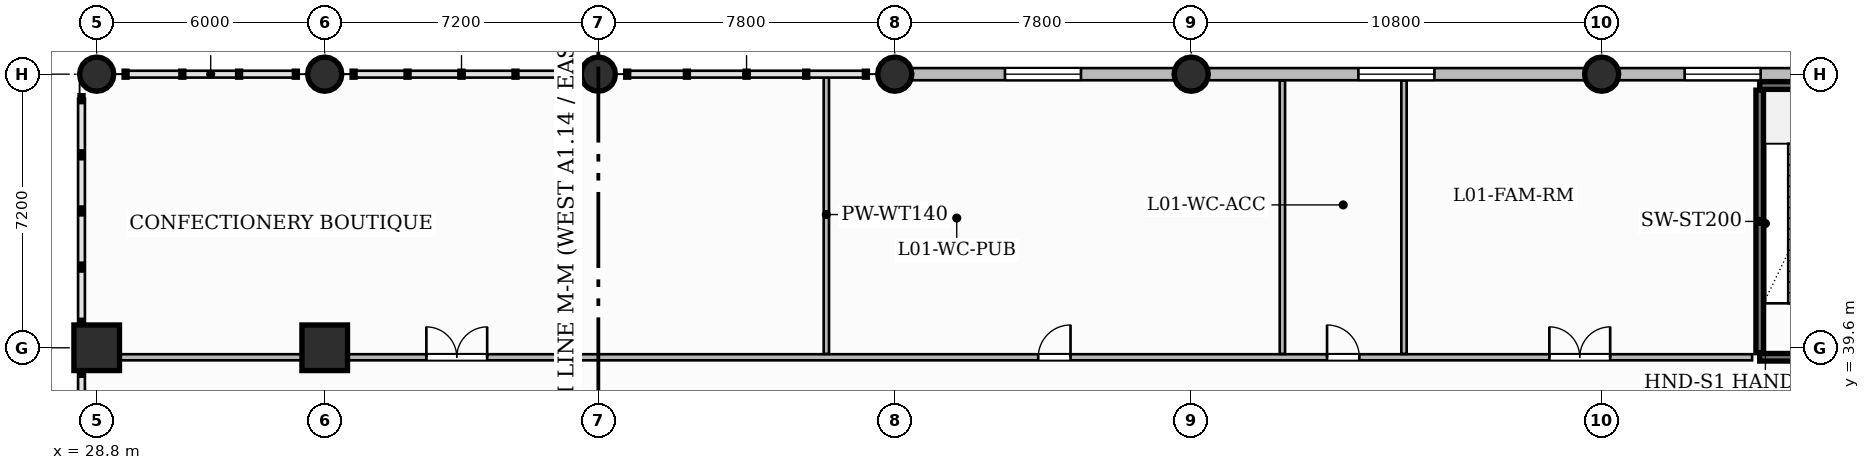
"""IFC4 building model, lengths in metres.
Left out: names, types, materials, properties, quantities, classifications, styles, units other than length and angle.
Written with IfcOpenShell. Run it as: python <this file> out.ifc"""

import sys

from ifc_helpers import new_model, si_unit, direction, frame, frame_2d, origin, origin_2d, place, context, subcontext, project, spatial, rectangle, circle, extrude, source, transform, mapped, element, fill, save


model = new_model("IFC4")
c1 = context("Model", 3, precision=1e-05, world=origin(), true_north=direction((0.0, 1.0)))
c2 = subcontext(c1, "Body", "Model", "MODEL_VIEW")
j1 = project(units=[si_unit("LENGTHUNIT", "METRE"), si_unit("PLANEANGLEUNIT", "RADIAN")], contexts=[c1])
p1 = place(None, origin())
s1 = spatial("IfcSite", under=j1, at=p1, CompositionType="ELEMENT")
p2 = place(p1, origin())
s2 = spatial("IfcBuilding", under=s1, at=p2, CompositionType="ELEMENT")
p3 = place(p2, frame((0.0, 0.0, 5.4)))
s3 = spatial("IfcBuildingStorey", under=s2, at=p3, CompositionType="ELEMENT", Elevation=5.4)
m1 = source(origin(), c2, "Body", "SweptSolid", [
    extrude(rectangle(XDim=1.2, YDim=1.2, at=origin_2d()), origin(), (0.0, 0.0, 1.0), 5.4),
])
p4 = place(p3, frame((28.8, 39.6, 0.0), z_axis=(0.0, 0.0, 1.0), x_axis=(1.0, 0.0, 0.0)))
e1 = element("IfcColumn", 1, at=p4, inside=s3, PredefinedType="COLUMN", context=c2, shape_type="MappedRepresentation", body=[
    mapped(m1, transform((0.0, 0.0, 0.0), scale=1.0)),
])
m2 = source(origin(), c2, "Body", "SweptSolid", [
    extrude(circle(Radius=0.45, at=origin_2d()), origin(), (0.0, 0.0, 1.0), 5.4),
])
p5 = place(p3, frame((28.8, 46.8, 0.0), z_axis=(0.0, 0.0, 1.0), x_axis=(1.0, 0.0, 0.0)))
e2 = element("IfcColumn", 2, at=p5, inside=s3, PredefinedType="COLUMN", context=c2, shape_type="MappedRepresentation", body=[
    mapped(m2, transform((0.0, 0.0, 0.0), scale=1.0)),
])
p6 = place(p3, frame((34.8, 39.6, 0.0), z_axis=(0.0, 0.0, 1.0), x_axis=(1.0, 0.0, 0.0)))
e3 = element("IfcColumn", 3, at=p6, inside=s3, PredefinedType="COLUMN", context=c2, shape_type="MappedRepresentation", body=[
    mapped(m1, transform((0.0, 0.0, 0.0), scale=1.0)),
])
for number, where, z_axis, x_axis in (
    (4, (34.8, 46.8, 0.0), (0.0, 0.0, 1.0), (1.0, 0.0, 0.0)),
    (5, (42.0, 46.8, 0.0), (0.0, 0.0, 1.0), (1.0, 0.0, 0.0)),
    (6, (49.8, 46.8, 0.0), (0.0, 0.0, 1.0), (1.0, 0.0, 0.0)),
    (7, (57.6, 46.8, 0.0), (0.0, 0.0, 1.0), (1.0, 0.0, 0.0)),
    (8, (68.4, 46.8, 0.0), (0.0, 0.0, 1.0), (1.0, 0.0, 0.0)),
):
    element("IfcColumn", number, at=place(p3, frame(where, z_axis=z_axis, x_axis=x_axis)), inside=s3, PredefinedType="COLUMN", context=c2, shape_type="MappedRepresentation", body=[
        mapped(m2, transform((0.0, 0.0, 0.0), scale=1.0)),
    ])
p7 = place(p3, frame((72.56, 39.47, 0.0), z_axis=(0.0, 0.0, 1.0), x_axis=(0.0, 1.0, 0.0)))
e9 = element("IfcWall", 9, at=p7, inside=s3, PredefinedType="SHEAR", context=c2, shape_type="SweptSolid", body=[
    extrude(rectangle(XDim=6.91, YDim=0.2, at=frame_2d((3.455, 0.0))), origin(), (0.0, 0.0, 1.0), 5.4),
])
p8 = place(p3, frame((72.56, 46.5, 0.0), z_axis=(0.0, 0.0, 1.0), x_axis=(1.0, 0.0, 0.0)))
e10 = element("IfcWall", 10, at=p8, inside=s3, PredefinedType="SHEAR", context=c2, shape_type="SweptSolid", body=[
    extrude(rectangle(XDim=2.94, YDim=0.2, at=frame_2d((1.47, 0.0))), origin(), (0.0, 0.0, 1.0), 5.4),
])
p9 = place(p3, frame((72.56, 39.35, 0.0), z_axis=(0.0, 0.0, 1.0), x_axis=(1.0, 0.0, 0.0)))
e11 = element("IfcWall", 11, at=p9, inside=s3, PredefinedType="SHEAR", context=c2, shape_type="SweptSolid", body=[
    extrude(rectangle(XDim=2.94, YDim=0.2, at=frame_2d((1.47, 0.0))), origin(), (0.0, 0.0, 1.0), 5.4),
])
p10 = place(p9, frame((0.985, 0.0, 0.0)))
e12 = element("IfcOpeningElement", 12, at=p10, cuts=e11, PredefinedType="OPENING", context=c2, shape_type="SweptSolid", body=[
    extrude(rectangle(XDim=1.05, YDim=2.2, at=frame_2d((0.525, 1.1))), frame((0.0, 0.11, 0.0), z_axis=(0.0, -1.0, 0.0), x_axis=(1.0, 0.0, 0.0)), (0.0, 0.0, 1.0), 0.22),
])
p11 = place(p3, frame((28.64, 39.35, 0.0), z_axis=(0.0, 0.0, 1.0), x_axis=(1.0, 0.0, 0.0)))
e13 = element("IfcWall", 13, at=p11, inside=s3, PredefinedType="PARTITIONING", context=c2, shape_type="SweptSolid", body=[
    extrude(rectangle(XDim=43.72, YDim=0.16, at=frame_2d((21.86, 0.0))), origin(), (0.0, 0.0, 1.0), 4.185),
])
p12 = place(p11, frame((8.835, 0.0, 0.0)))
e14 = element("IfcOpeningElement", 14, at=p12, cuts=e13, PredefinedType="OPENING", context=c2, shape_type="SweptSolid", body=[
    extrude(rectangle(XDim=1.6, YDim=2.4, at=frame_2d((0.8, 1.2))), frame((0.0, 0.09, 0.0), z_axis=(0.0, -1.0, 0.0), x_axis=(1.0, 0.0, 0.0)), (0.0, 0.0, 1.0), 0.18),
])
p13 = place(p11, frame((24.935, 0.0, 0.0)))
e15 = element("IfcOpeningElement", 15, at=p13, cuts=e13, PredefinedType="OPENING", context=c2, shape_type="SweptSolid", body=[
    extrude(rectangle(XDim=0.85, YDim=2.1, at=frame_2d((0.425, 1.05))), frame((0.0, 0.09, 0.0), z_axis=(0.0, -1.0, 0.0), x_axis=(1.0, 0.0, 0.0)), (0.0, 0.0, 1.0), 0.18),
])
p14 = place(p11, frame((32.535, 0.0, 0.0)))
e16 = element("IfcOpeningElement", 16, at=p14, cuts=e13, PredefinedType="OPENING", context=c2, shape_type="SweptSolid", body=[
    extrude(rectangle(XDim=0.85, YDim=2.1, at=frame_2d((0.425, 1.05))), frame((0.0, 0.09, 0.0), z_axis=(0.0, -1.0, 0.0), x_axis=(1.0, 0.0, 0.0)), (0.0, 0.0, 1.0), 0.18),
])
p15 = place(p11, frame((38.385, 0.0, 0.0)))
e17 = element("IfcOpeningElement", 17, at=p15, cuts=e13, PredefinedType="OPENING", context=c2, shape_type="SweptSolid", body=[
    extrude(rectangle(XDim=1.6, YDim=2.4, at=frame_2d((0.8, 1.2))), frame((0.0, 0.09, 0.0), z_axis=(0.0, -1.0, 0.0), x_axis=(1.0, 0.0, 0.0)), (0.0, 0.0, 1.0), 0.18),
])
p16 = place(p3, frame((48.0, 39.44, 0.0), z_axis=(0.0, 0.0, 1.0), x_axis=(0.0, 1.0, 0.0)))
e18 = element("IfcWall", 18, at=p16, inside=s3, PredefinedType="PARTITIONING", context=c2, shape_type="SweptSolid", body=[
    extrude(rectangle(XDim=7.332, YDim=0.14, at=frame_2d((3.666, 0.0))), origin(), (0.0, 0.0, 1.0), 5.1),
])
for number, where, z_axis, x_axis in (
    (19, (60.0, 39.44, 0.0), (0.0, 0.0, 1.0), (0.0, 1.0, 0.0)),
    (20, (63.2, 39.44, 0.0), (0.0, 0.0, 1.0), (0.0, 1.0, 0.0)),
):
    element("IfcWall", number, at=place(p3, frame(where, z_axis=z_axis, x_axis=x_axis)), inside=s3, PredefinedType="PARTITIONING", context=c2, shape_type="SweptSolid", body=[
        extrude(rectangle(XDim=7.192, YDim=0.14, at=frame_2d((3.596, 0.0))), origin(), (0.0, 0.0, 1.0), 5.1),
    ])
p17 = place(p3, frame((49.8, 46.8, 0.0), z_axis=(0.0, 0.0, 1.0), x_axis=(1.0, 0.0, 0.0)))
e21 = element("IfcWall", 21, at=p17, inside=s3, PredefinedType="SOLIDWALL", context=c2, shape_type="SweptSolid", body=[
    extrude(rectangle(XDim=30.6, YDim=0.32, at=frame_2d((15.3, 0.0))), origin(), (0.0, 0.0, 1.0), 4.185),
])
p18 = place(p17, frame((2.9, 0.0, 0.75)))
e22 = element("IfcOpeningElement", 22, at=p18, cuts=e21, PredefinedType="OPENING", context=c2, shape_type="SweptSolid", body=[
    extrude(rectangle(XDim=2.0, YDim=2.6, at=frame_2d((1.0, 1.3))), frame((0.0, 0.17, 0.0), z_axis=(0.0, -1.0, 0.0), x_axis=(1.0, 0.0, 0.0)), (0.0, 0.0, 1.0), 0.34),
])
p19 = place(p17, frame((12.2, 0.0, 0.75)))
e23 = element("IfcOpeningElement", 23, at=p19, cuts=e21, PredefinedType="OPENING", context=c2, shape_type="SweptSolid", body=[
    extrude(rectangle(XDim=2.0, YDim=2.6, at=frame_2d((1.0, 1.3))), frame((0.0, 0.17, 0.0), z_axis=(0.0, -1.0, 0.0), x_axis=(1.0, 0.0, 0.0)), (0.0, 0.0, 1.0), 0.34),
])
p20 = place(p17, frame((20.785, 0.0, 0.75)))
e24 = element("IfcOpeningElement", 24, at=p20, cuts=e21, PredefinedType="OPENING", context=c2, shape_type="SweptSolid", body=[
    extrude(rectangle(XDim=2.0, YDim=2.6, at=frame_2d((1.0, 1.3))), frame((0.0, 0.17, 0.0), z_axis=(0.0, -1.0, 0.0), x_axis=(1.0, 0.0, 0.0)), (0.0, 0.0, 1.0), 0.34),
])
p21 = place(p17, frame((25.445, 0.0, 0.75)))
e25 = element("IfcOpeningElement", 25, at=p21, cuts=e21, PredefinedType="OPENING", context=c2, shape_type="SweptSolid", body=[
    extrude(rectangle(XDim=2.0, YDim=2.6, at=frame_2d((1.0, 1.3))), frame((0.0, 0.17, 0.0), z_axis=(0.0, -1.0, 0.0), x_axis=(1.0, 0.0, 0.0)), (0.0, 0.0, 1.0), 0.34),
])
m3 = source(origin(), c2, "Body", "SweptSolid", [
    extrude(rectangle(XDim=1.6, YDim=2.4, at=frame_2d((0.8, 1.2))), frame((0.0, 0.025, 0.0), z_axis=(0.0, -1.0, 0.0), x_axis=(1.0, 0.0, 0.0)), (0.0, 0.0, 1.0), 0.05),
])
p22 = place(p12, origin())
e26 = element("IfcDoor", 26, at=p22, inside=s3, OperationType="DOUBLE_DOOR_SINGLE_SWING", PredefinedType="DOOR", context=c2, shape_type="MappedRepresentation", body=[
    mapped(m3, transform((0.0, 0.0, 0.0), scale=1.0)),
])
fill(e14, e26)
m4 = source(origin(), c2, "Body", "SweptSolid", [
    extrude(rectangle(XDim=0.85, YDim=2.1, at=frame_2d((0.425, 1.05))), frame((0.0, 0.025, 0.0), z_axis=(0.0, -1.0, 0.0), x_axis=(1.0, 0.0, 0.0)), (0.0, 0.0, 1.0), 0.05),
])
p23 = place(p13, origin())
e27 = element("IfcDoor", 27, at=p23, inside=s3, OperationType="SINGLE_SWING_RIGHT", PredefinedType="DOOR", context=c2, shape_type="MappedRepresentation", body=[
    mapped(m4, transform((0.0, 0.0, 0.0), scale=1.0)),
])
fill(e15, e27)
p24 = place(p14, origin())
e28 = element("IfcDoor", 28, at=p24, inside=s3, OperationType="SINGLE_SWING_LEFT", PredefinedType="DOOR", context=c2, shape_type="MappedRepresentation", body=[
    mapped(m4, transform((0.0, 0.0, 0.0), scale=1.0)),
])
fill(e16, e28)
p25 = place(p15, origin())
e29 = element("IfcDoor", 29, at=p25, inside=s3, OperationType="DOUBLE_DOOR_SINGLE_SWING", PredefinedType="DOOR", context=c2, shape_type="MappedRepresentation", body=[
    mapped(m3, transform((0.0, 0.0, 0.0), scale=1.0)),
])
fill(e17, e29)
m5 = source(origin(), c2, "Body", "SweptSolid", [
    extrude(rectangle(XDim=2.0, YDim=2.6, at=frame_2d((1.0, 1.3))), frame((0.0, 0.03, 0.0), z_axis=(0.0, -1.0, 0.0), x_axis=(1.0, 0.0, 0.0)), (0.0, 0.0, 1.0), 0.06),
])
p26 = place(p18, origin())
e30 = element("IfcWindow", 30, at=p26, inside=s3, PartitioningType="DOUBLE_PANEL_VERTICAL", PredefinedType="WINDOW", context=c2, shape_type="MappedRepresentation", body=[
    mapped(m5, transform((0.0, 0.0, 0.0), scale=1.0)),
])
fill(e22, e30)
p27 = place(p19, origin())
e31 = element("IfcWindow", 31, at=p27, inside=s3, PartitioningType="DOUBLE_PANEL_VERTICAL", PredefinedType="WINDOW", context=c2, shape_type="MappedRepresentation", body=[
    mapped(m5, transform((0.0, 0.0, 0.0), scale=1.0)),
])
fill(e23, e31)
p28 = place(p20, origin())
e32 = element("IfcWindow", 32, at=p28, inside=s3, PartitioningType="DOUBLE_PANEL_VERTICAL", PredefinedType="WINDOW", context=c2, shape_type="MappedRepresentation", body=[
    mapped(m5, transform((0.0, 0.0, 0.0), scale=1.0)),
])
fill(e24, e32)
save(model, sys.argv[1])
